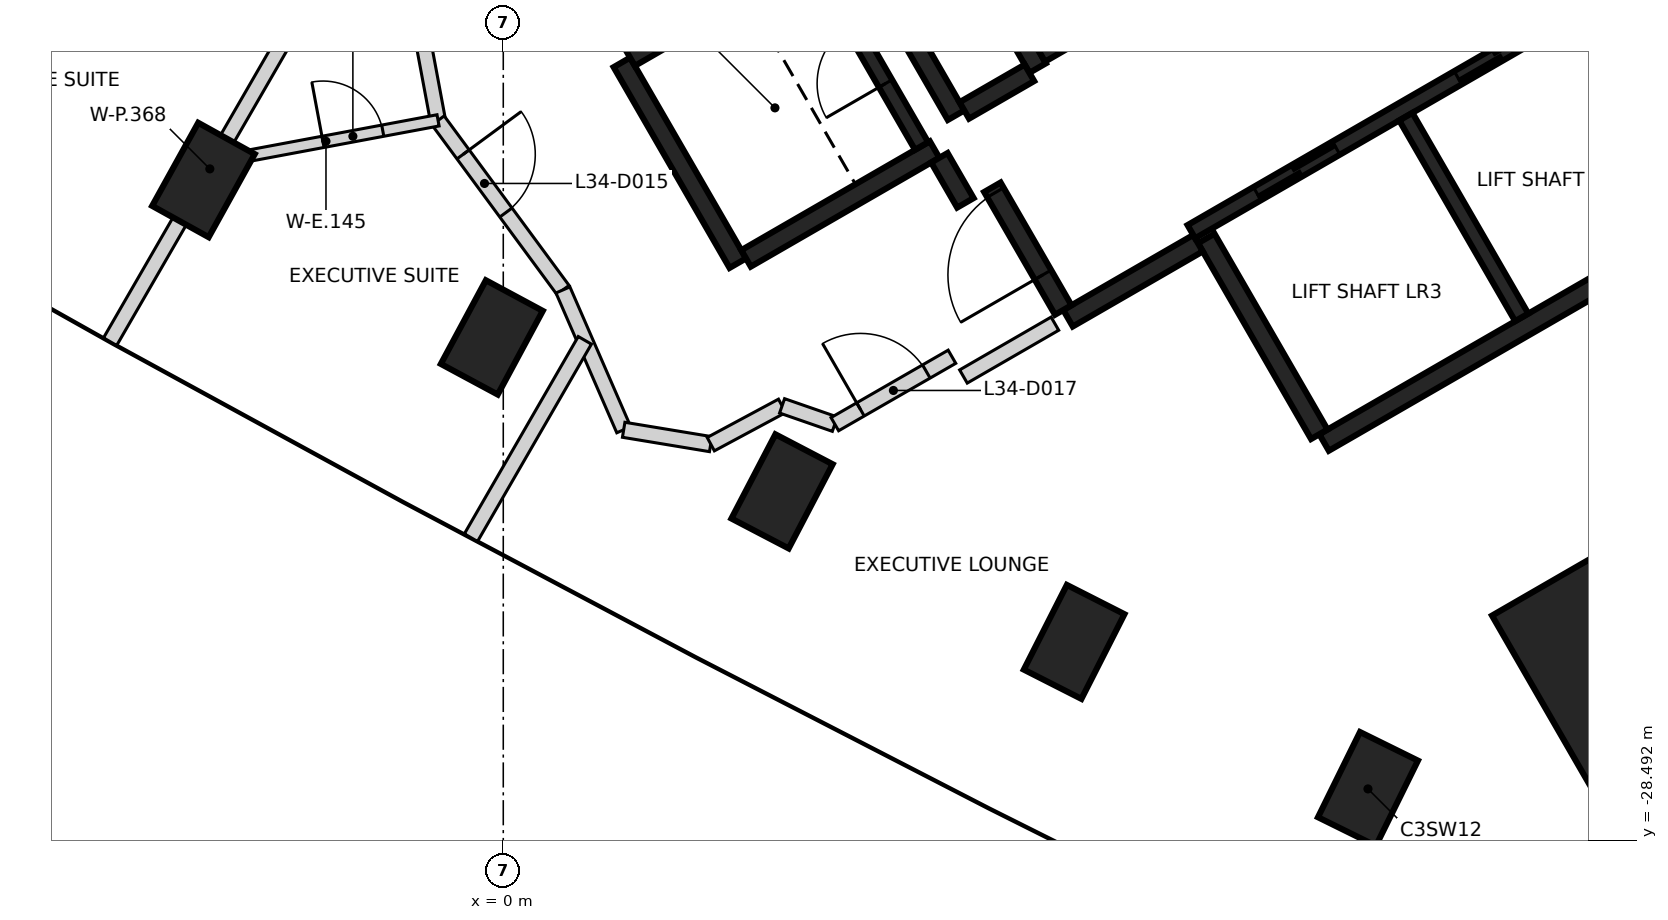
"""IFC4 building model, lengths in metres.
Left out: names, types, materials, properties, quantities, classifications, styles, units other than length and angle.
Written with IfcOpenShell. Run it as: python <this file> out.ifc"""

import sys

from ifc_helpers import new_model, si_unit, direction, frame, frame_2d, origin, origin_2d, place, context, subcontext, project, spatial, rectangle, extrude, element, fill, save


model = new_model("IFC4")
c1 = context("Model", 3, precision=1e-05, world=origin(), true_north=direction((0.0, 1.0)))
c2 = subcontext(c1, "Body", "Model", "MODEL_VIEW")
j1 = project(units=[si_unit("LENGTHUNIT", "METRE"), si_unit("PLANEANGLEUNIT", "RADIAN")], contexts=[c1])
p1 = place(None, origin())
s1 = spatial("IfcSite", under=j1, at=p1, CompositionType="ELEMENT")
p2 = place(p1, origin())
s2 = spatial("IfcBuilding", under=s1, at=p2, CompositionType="ELEMENT")
p3 = place(p2, frame((0.0, 0.0, 139.6)))
s3 = spatial("IfcBuildingStorey", under=s2, at=p3, CompositionType="ELEMENT", Elevation=139.6)
for number, where, z_axis, x_axis in (
    (1, (-3.945, -19.8, -0.4), (0.0, 0.0, 1.0), (0.485, 0.875, 0.0)),
    (2, (-0.151, -21.871, -0.4), (0.0, 0.0, 1.0), (0.474, 0.881, 0.0)),
    (3, (3.667, -23.896, -0.4), (0.0, 0.0, 1.0), (0.463, 0.886, 0.0)),
    (4, (7.51, -25.876, -0.4), (0.0, 0.0, 1.0), (0.453, 0.892, 0.0)),
    (5, (11.376, -27.811, -0.4), (0.0, 0.0, 1.0), (0.442, 0.897, 0.0)),
):
    element("IfcColumn", number, at=place(p3, frame(where, z_axis=z_axis, x_axis=x_axis)), inside=s3, PredefinedType="COLUMN", context=c2, shape_type="SweptSolid", body=[
        extrude(rectangle(XDim=1.25, YDim=0.85, at=origin_2d()), origin(), (0.0, 0.0, 1.0), 3.6),
    ])
p4 = place(p3, frame((15.207, -26.34, -0.4), z_axis=(0.0, 0.0, 1.0), x_axis=(-0.5, 0.866025403784, 0.0)))
e6 = element("IfcColumn", 6, at=p4, inside=s3, PredefinedType="COLUMN", context=c2, shape_type="SweptSolid", body=[
    extrude(rectangle(XDim=3.6, YDim=3.0, at=origin_2d()), origin(), (0.0, 0.0, 1.0), 3.6),
])
p5 = place(p3, frame((15.865, -20.328, 0.0), z_axis=(0.0, 0.0, 1.0), x_axis=(-0.86602852612, -0.499994591916, 0.0)))
e7 = element("IfcWall", 7, at=p5, inside=s3, PredefinedType="SHEAR", context=c2, shape_type="SweptSolid", body=[
    extrude(rectangle(XDim=5.85, YDim=0.25, at=frame_2d((2.925, 0.0))), origin(), (0.0, 0.0, 1.0), 3.2),
])
p6 = place(p3, frame((7.031, -18.327, 0.0), z_axis=(0.0, 0.0, 1.0), x_axis=(-0.499971222258, 0.866042017984, 0.0)))
e8 = element("IfcWall", 8, at=p6, inside=s3, PredefinedType="SHEAR", context=c2, shape_type="SweptSolid", body=[
    extrude(rectangle(XDim=3.2, YDim=0.25, at=frame_2d((1.6, 0.0))), origin(), (0.0, 0.0, 1.0), 3.2),
])
for number, where, z_axis, x_axis in (
    (9, (14.315, -17.644, 0.0), (0.0, 0.0, 1.0), (0.5, -0.866, 0.0)),
    (10, (10.736, -23.145, 0.0), (0.0, 0.0, 1.0), (-0.5, 0.866, 0.0)),
):
    element("IfcWall", number, at=place(p3, frame(where, z_axis=z_axis, x_axis=x_axis)), inside=s3, PredefinedType="SHEAR", context=c2, shape_type="SweptSolid", body=[
        extrude(rectangle(XDim=2.974, YDim=0.25, at=frame_2d((1.487, 0.0))), origin(), (0.0, 0.0, 1.0), 3.2),
    ])
p7 = place(p3, frame((3.085, -20.894, 0.0), z_axis=(0.0, 0.0, 1.0), x_axis=(-0.499978833458, 0.866037623948, 0.0)))
e11 = element("IfcWall", 11, at=p7, inside=s3, PredefinedType="SHEAR", context=c2, shape_type="SweptSolid", body=[
    extrude(rectangle(XDim=3.05, YDim=0.25, at=frame_2d((1.525, 0.0))), origin(), (0.0, 0.0, 1.0), 3.2),
])
p8 = place(p3, frame((1.669, -18.19, 0.0), z_axis=(0.0, 0.0, 1.0), x_axis=(0.866042235819, 0.499970844928, 0.0)))
e12 = element("IfcWall", 12, at=p8, inside=s3, PredefinedType="SHEAR", context=c2, shape_type="SweptSolid", body=[
    extrude(rectangle(XDim=2.865, YDim=0.25, at=frame_2d((1.432, 0.0))), origin(), (0.0, 0.0, 1.0), 3.2),
])
p9 = place(p3, frame((5.675, -19.399, 0.0), z_axis=(0.0, 0.0, 1.0), x_axis=(-0.866026637627, -0.499997862916, 0.0)))
e13 = element("IfcWall", 13, at=p9, inside=s3, PredefinedType="SHEAR", context=c2, shape_type="SweptSolid", body=[
    extrude(rectangle(XDim=2.865, YDim=0.25, at=frame_2d((1.432, 0.0))), origin(), (0.0, 0.0, 1.0), 3.2),
])
p10 = place(p3, frame((4.414, -16.276, 0.0), z_axis=(0.0, 0.0, 1.0), x_axis=(0.500003324108, -0.866023484601, 0.0)))
e14 = element("IfcWall", 14, at=p10, inside=s3, PredefinedType="SHEAR", context=c2, shape_type="SweptSolid", body=[
    extrude(rectangle(XDim=3.085, YDim=0.25, at=frame_2d((1.542, 0.0))), origin(), (0.0, 0.0, 1.0), 3.2),
])
p11 = place(p3, frame((9.14, -20.631, 0.0), z_axis=(0.0, 0.0, 1.0), x_axis=(-0.866043531843, -0.499968599967, 0.0)))
e15 = element("IfcWall", 15, at=p11, inside=s3, PredefinedType="SHEAR", context=c2, shape_type="SweptSolid", body=[
    extrude(rectangle(XDim=1.975, YDim=0.25, at=frame_2d((0.987, 0.0))), origin(), (0.0, 0.0, 1.0), 3.2),
])
p12 = place(p3, frame((7.367, -21.51, 0.0), z_axis=(0.0, 0.0, 1.0), x_axis=(-0.499983108224, 0.866035156036, 0.0)))
e16 = element("IfcWall", 16, at=p12, inside=s3, PredefinedType="SHEAR", context=c2, shape_type="SweptSolid", body=[
    extrude(rectangle(XDim=1.865, YDim=0.25, at=frame_2d((0.932, 0.0))), origin(), (0.0, 0.0, 1.0), 3.2),
])
p13 = place(p12, frame((0.535, 0.0, 0.0)))
e17 = element("IfcOpeningElement", 17, at=p13, cuts=e16, PredefinedType="OPENING", context=c2, shape_type="SweptSolid", body=[
    extrude(rectangle(XDim=1.25, YDim=2.1, at=frame_2d((0.625, 1.05))), frame((0.0, 0.135, 0.0), z_axis=(0.0, -1.0, 0.0), x_axis=(1.0, 0.0, 0.0)), (0.0, 0.0, 1.0), 0.27),
])
p14 = place(p3, frame((6.065, -18.885, 0.0), z_axis=(0.0, 0.0, 1.0), x_axis=(0.866017078145, 0.500014420154, 0.0)))
e18 = element("IfcWall", 18, at=p14, inside=s3, PredefinedType="SHEAR", context=c2, shape_type="SweptSolid", body=[
    extrude(rectangle(XDim=0.989, YDim=0.25, at=frame_2d((0.495, 0.0))), origin(), (0.0, 0.0, 1.0), 3.2),
])
p15 = place(p3, frame((6.08, -20.1, 0.0), z_axis=(0.0, 0.0, 1.0), x_axis=(-0.500051773299, 0.865995510393, 0.0)))
e19 = element("IfcWall", 19, at=p15, inside=s3, PredefinedType="SHEAR", context=c2, shape_type="SweptSolid", body=[
    extrude(rectangle(XDim=0.685, YDim=0.25, at=frame_2d((0.342, 0.0))), origin(), (0.0, 0.0, 1.0), 3.2),
])
p16 = place(p3, frame((9.052, -20.48, 0.0), z_axis=(0.0, 0.0, 1.0), x_axis=(0.866030299012, 0.499991521122, 0.0)))
e20 = element("IfcWall", 20, at=p16, inside=s3, PredefinedType="SHEAR", context=c2, shape_type="SweptSolid", body=[
    extrude(rectangle(XDim=6.1, YDim=0.2, at=frame_2d((3.05, 0.0))), origin(), (0.0, 0.0, 1.0), 3.2),
])
p17 = place(p16, frame((1.0, 0.0, 0.0)))
e21 = element("IfcOpeningElement", 21, at=p17, cuts=e20, PredefinedType="OPENING", context=c2, shape_type="SweptSolid", body=[
    extrude(rectangle(XDim=1.2, YDim=2.1, at=frame_2d((0.6, 1.05))), frame((0.0, 0.11, 0.0), z_axis=(0.0, -1.0, 0.0), x_axis=(1.0, 0.0, 0.0)), (0.0, 0.0, 1.0), 0.22),
])
p18 = place(p16, frame((4.05, 0.0, 0.0)))
e22 = element("IfcOpeningElement", 22, at=p18, cuts=e20, PredefinedType="OPENING", context=c2, shape_type="SweptSolid", body=[
    extrude(rectangle(XDim=1.2, YDim=2.1, at=frame_2d((0.6, 1.05))), frame((0.0, 0.11, 0.0), z_axis=(0.0, -1.0, 0.0), x_axis=(1.0, 0.0, 0.0)), (0.0, 0.0, 1.0), 0.22),
])
p19 = place(p3, frame((7.077, -18.156, 0.0), z_axis=(0.0, 0.0, 1.0), x_axis=(0.866038630372, 0.499977090179, 0.0)))
e23 = element("IfcWall", 23, at=p19, inside=s3, PredefinedType="SHEAR", context=c2, shape_type="SweptSolid", body=[
    extrude(rectangle(XDim=5.699, YDim=0.2, at=frame_2d((2.85, 0.0))), origin(), (0.0, 0.0, 1.0), 3.2),
])
p20 = place(p19, frame((0.899, 0.0, 0.0)))
e24 = element("IfcOpeningElement", 24, at=p20, cuts=e23, PredefinedType="OPENING", context=c2, shape_type="SweptSolid", body=[
    extrude(rectangle(XDim=0.9, YDim=2.1, at=frame_2d((0.45, 1.05))), frame((0.0, 0.11, 0.0), z_axis=(0.0, -1.0, 0.0), x_axis=(1.0, 0.0, 0.0)), (0.0, 0.0, 1.0), 0.22),
])
p21 = place(p19, frame((3.874, 0.0, 0.0)))
e25 = element("IfcOpeningElement", 25, at=p21, cuts=e23, PredefinedType="OPENING", context=c2, shape_type="SweptSolid", body=[
    extrude(rectangle(XDim=0.9, YDim=2.1, at=frame_2d((0.45, 1.05))), frame((0.0, 0.11, 0.0), z_axis=(0.0, -1.0, 0.0), x_axis=(1.0, 0.0, 0.0)), (0.0, 0.0, 1.0), 0.22),
])
p22 = place(p3, frame((11.875, -18.967, 0.0), z_axis=(0.0, 0.0, 1.0), x_axis=(0.49998131003, -0.866036194175, 0.0)))
e26 = element("IfcWall", 26, at=p22, inside=s3, PredefinedType="SHEAR", context=c2, shape_type="SweptSolid", body=[
    extrude(rectangle(XDim=3.048, YDim=0.2, at=frame_2d((1.524, 0.0))), origin(), (0.0, 0.0, 1.0), 3.2),
])
p23 = place(p3, frame((5.503, -19.352, 0.0), z_axis=(0.0, 0.0, 1.0), x_axis=(-0.499986818241, 0.866033014143, 0.0)))
e27 = element("IfcWall", 27, at=p23, inside=s3, PredefinedType="SHEAR", context=c2, shape_type="SweptSolid", body=[
    extrude(rectangle(XDim=2.798, YDim=0.2, at=frame_2d((1.399, 0.0))), origin(), (0.0, 0.0, 1.0), 3.2),
])
p24 = place(p23, frame((0.949, 0.0, 0.0)))
e28 = element("IfcOpeningElement", 28, at=p24, cuts=e27, PredefinedType="OPENING", context=c2, shape_type="SweptSolid", body=[
    extrude(rectangle(XDim=0.9, YDim=2.1, at=frame_2d((0.45, 1.05))), frame((0.0, 0.11, 0.0), z_axis=(0.0, -1.0, 0.0), x_axis=(1.0, 0.0, 0.0)), (0.0, 0.0, 1.0), 0.22),
])
p25 = place(p3, frame((-1.212, -17.131, 0.0), z_axis=(0.0, 0.0, 1.0), x_axis=(0.183680924698, -0.982985919483, 0.0)))
e29 = element("IfcWall", 29, at=p25, inside=s3, PredefinedType="PARTITIONING", context=c2, shape_type="SweptSolid", body=[
    extrude(rectangle(XDim=1.917, YDim=0.2, at=frame_2d((0.958, 0.0))), origin(), (0.0, 0.0, 1.0), 3.2),
])
p26 = place(p3, frame((-0.858, -19.016, 0.0), z_axis=(0.0, 0.0, 1.0), x_axis=(0.593123867414, -0.805111220829, 0.0)))
e30 = element("IfcWall", 30, at=p26, inside=s3, PredefinedType="PARTITIONING", context=c2, shape_type="SweptSolid", body=[
    extrude(rectangle(XDim=2.77, YDim=0.2, at=frame_2d((1.385, 0.0))), origin(), (0.0, 0.0, 1.0), 3.2),
])
p27 = place(p26, frame((0.555, 0.0, 0.0)))
e31 = element("IfcOpeningElement", 31, at=p27, cuts=e30, PredefinedType="OPENING", context=c2, shape_type="SweptSolid", body=[
    extrude(rectangle(XDim=0.95, YDim=2.1, at=frame_2d((0.475, 1.05))), frame((0.0, 0.11, 0.0), z_axis=(0.0, -1.0, 0.0), x_axis=(1.0, 0.0, 0.0)), (0.0, 0.0, 1.0), 0.22),
])
p28 = place(p3, frame((0.785, -21.246, 0.0), z_axis=(0.0, 0.0, 1.0), x_axis=(0.398864077761, -0.917010058545, 0.0)))
e32 = element("IfcWall", 32, at=p28, inside=s3, PredefinedType="PARTITIONING", context=c2, shape_type="SweptSolid", body=[
    extrude(rectangle(XDim=2.006, YDim=0.2, at=frame_2d((1.003, 0.0))), origin(), (0.0, 0.0, 1.0), 2.3),
])
p29 = place(p3, frame((1.584, -23.086, 0.0), z_axis=(0.0, 0.0, 1.0), x_axis=(0.986654221629, -0.162829502674, 0.0)))
e33 = element("IfcWall", 33, at=p29, inside=s3, PredefinedType="PARTITIONING", context=c2, shape_type="SweptSolid", body=[
    extrude(rectangle(XDim=1.16, YDim=0.2, at=frame_2d((0.58, 0.0))), origin(), (0.0, 0.0, 1.0), 2.3),
])
p30 = place(p3, frame((2.73, -23.275, 0.0), z_axis=(0.0, 0.0, 1.0), x_axis=(0.880927165636, 0.473251866182, 0.0)))
e34 = element("IfcWall", 34, at=p30, inside=s3, PredefinedType="PARTITIONING", context=c2, shape_type="SweptSolid", body=[
    extrude(rectangle(XDim=1.065, YDim=0.2, at=frame_2d((0.532, 0.0))), origin(), (0.0, 0.0, 1.0), 3.2),
])
p31 = place(p3, frame((3.668, -22.771, 0.0), z_axis=(0.0, 0.0, 1.0), x_axis=(0.944689393684, -0.327966384652, 0.0)))
e35 = element("IfcWall", 35, at=p31, inside=s3, PredefinedType="PARTITIONING", context=c2, shape_type="SweptSolid", body=[
    extrude(rectangle(XDim=0.735, YDim=0.2, at=frame_2d((0.367, 0.0))), origin(), (0.0, 0.0, 1.0), 3.2),
])
p32 = place(p3, frame((4.362, -23.012, 0.0), z_axis=(0.0, 0.0, 1.0), x_axis=(0.866692617793, 0.49884256661, 0.0)))
e36 = element("IfcWall", 36, at=p32, inside=s3, PredefinedType="PARTITIONING", context=c2, shape_type="SweptSolid", body=[
    extrude(rectangle(XDim=1.778, YDim=0.2, at=frame_2d((0.889, 0.0))), origin(), (0.0, 0.0, 1.0), 3.2),
])
p33 = place(p32, frame((0.389, 0.0, 0.0)))
e37 = element("IfcOpeningElement", 37, at=p33, cuts=e36, PredefinedType="OPENING", context=c2, shape_type="SweptSolid", body=[
    extrude(rectangle(XDim=1.0, YDim=2.1, at=frame_2d((0.5, 1.05))), frame((0.0, 0.11, 0.0), z_axis=(0.0, -1.0, 0.0), x_axis=(1.0, 0.0, 0.0)), (0.0, 0.0, 1.0), 0.22),
])
p34 = place(p3, frame((6.054, -22.385, 0.0), z_axis=(0.0, 0.0, 1.0), x_axis=(0.86593101922, 0.500163443238, 0.0)))
e38 = element("IfcWall", 38, at=p34, inside=s3, PredefinedType="PARTITIONING", context=c2, shape_type="SweptSolid", body=[
    extrude(rectangle(XDim=1.39, YDim=0.2, at=frame_2d((0.695, 0.0))), origin(), (0.0, 0.0, 1.0), 3.2),
])
p35 = place(p3, frame((-9.882, -19.267, 0.0), z_axis=(0.0, 0.0, 1.0), x_axis=(0.499993811829, 0.866028976497, 0.0)))
e39 = element("IfcWall", 39, at=p35, inside=s3, PredefinedType="PARTITIONING", context=c2, shape_type="SweptSolid", body=[
    extrude(rectangle(XDim=12.227, YDim=0.2, at=frame_2d((6.114, 0.0))), origin(), (0.0, 0.0, 1.0), 2.3),
])
p36 = place(p3, frame((-5.173, -21.926, 0.0), z_axis=(0.0, 0.0, 1.0), x_axis=(0.499941227542, 0.86605933342, 0.0)))
e40 = element("IfcWall", 40, at=p36, inside=s3, PredefinedType="PARTITIONING", context=c2, shape_type="SweptSolid", body=[
    extrude(rectangle(XDim=5.249, YDim=0.2, at=frame_2d((2.625, 0.0))), origin(), (0.0, 0.0, 1.0), 3.2),
])
p37 = place(p3, frame((-0.425, -24.505, 0.0), z_axis=(0.0, 0.0, 1.0), x_axis=(0.499915194772, 0.86607436057, 0.0)))
e41 = element("IfcWall", 41, at=p37, inside=s3, PredefinedType="PARTITIONING", context=c2, shape_type="SweptSolid", body=[
    extrude(rectangle(XDim=2.997, YDim=0.2, at=frame_2d((1.499, 0.0))), origin(), (0.0, 0.0, 1.0), 2.3),
])
p38 = place(p3, frame((-3.807, -19.566, 0.0), z_axis=(0.0, 0.0, 1.0), x_axis=(0.982987155193, 0.183674311555, 0.0)))
e42 = element("IfcWall", 42, at=p38, inside=s3, PredefinedType="PARTITIONING", context=c2, shape_type="SweptSolid", body=[
    extrude(rectangle(XDim=3.0, YDim=0.15, at=frame_2d((1.5, 0.0))), origin(), (0.0, 0.0, 1.0), 3.2),
])
p39 = place(p38, frame((1.46, 0.0, 0.0)))
e43 = element("IfcOpeningElement", 43, at=p39, cuts=e42, PredefinedType="OPENING", context=c2, shape_type="SweptSolid", body=[
    extrude(rectangle(XDim=0.8, YDim=2.1, at=frame_2d((0.4, 1.05))), frame((0.0, 0.085, 0.0), z_axis=(0.0, -1.0, 0.0), x_axis=(1.0, 0.0, 0.0)), (0.0, 0.0, 1.0), 0.17),
])
p40 = place(p17, origin())
e44 = element("IfcDoor", 44, at=p40, inside=s3, OperationType="DOUBLE_DOOR_SLIDING", PredefinedType="DOOR", context=c2, shape_type="SweptSolid", body=[
    extrude(rectangle(XDim=1.2, YDim=2.1, at=frame_2d((0.6, 1.05))), frame((0.0, 0.025, 0.0), z_axis=(0.0, -1.0, 0.0), x_axis=(1.0, 0.0, 0.0)), (0.0, 0.0, 1.0), 0.05),
])
fill(e21, e44)
p41 = place(p18, origin())
e45 = element("IfcDoor", 45, at=p41, inside=s3, OperationType="DOUBLE_DOOR_SLIDING", PredefinedType="DOOR", context=c2, shape_type="SweptSolid", body=[
    extrude(rectangle(XDim=1.2, YDim=2.1, at=frame_2d((0.6, 1.05))), frame((0.0, 0.025, 0.0), z_axis=(0.0, -1.0, 0.0), x_axis=(1.0, 0.0, 0.0)), (0.0, 0.0, 1.0), 0.05),
])
fill(e22, e45)
p42 = place(p13, origin())
e46 = element("IfcDoor", 46, at=p42, inside=s3, OperationType="SINGLE_SWING_LEFT", PredefinedType="DOOR", context=c2, shape_type="SweptSolid", body=[
    extrude(rectangle(XDim=1.25, YDim=2.1, at=frame_2d((0.625, 1.05))), frame((0.0, 0.025, 0.0), z_axis=(0.0, -1.0, 0.0), x_axis=(1.0, 0.0, 0.0)), (0.0, 0.0, 1.0), 0.05),
])
fill(e17, e46)
p43 = place(p24, origin())
e47 = element("IfcDoor", 47, at=p43, inside=s3, OperationType="SINGLE_SWING_RIGHT", PredefinedType="DOOR", context=c2, shape_type="SweptSolid", body=[
    extrude(rectangle(XDim=0.9, YDim=2.1, at=frame_2d((0.45, 1.05))), frame((0.0, 0.025, 0.0), z_axis=(0.0, -1.0, 0.0), x_axis=(1.0, 0.0, 0.0)), (0.0, 0.0, 1.0), 0.05),
])
fill(e28, e47)
p44 = place(p27, frame((0.95, 0.0, 0.0), z_axis=(0.0, 0.0, 1.0), x_axis=(-1.0, 0.0, 0.0)))
e48 = element("IfcDoor", 48, at=p44, inside=s3, OperationType="SINGLE_SWING_LEFT", PredefinedType="DOOR", context=c2, shape_type="SweptSolid", body=[
    extrude(rectangle(XDim=0.95, YDim=2.1, at=frame_2d((0.475, 1.05))), frame((0.0, 0.025, 0.0), z_axis=(0.0, -1.0, 0.0), x_axis=(1.0, 0.0, 0.0)), (0.0, 0.0, 1.0), 0.05),
])
fill(e31, e48)
p45 = place(p39, frame((0.8, 0.0, 0.0), z_axis=(0.0, 0.0, 1.0), x_axis=(-1.0, 0.0, 0.0)))
e49 = element("IfcDoor", 49, at=p45, inside=s3, OperationType="SINGLE_SWING_LEFT", PredefinedType="DOOR", context=c2, shape_type="SweptSolid", body=[
    extrude(rectangle(XDim=0.8, YDim=2.1, at=frame_2d((0.4, 1.05))), frame((0.0, 0.025, 0.0), z_axis=(0.0, -1.0, 0.0), x_axis=(1.0, 0.0, 0.0)), (0.0, 0.0, 1.0), 0.05),
])
fill(e43, e49)
p46 = place(p33, frame((1.0, 0.0, 0.0), z_axis=(0.0, 0.0, 1.0), x_axis=(-1.0, 0.0, 0.0)))
e50 = element("IfcDoor", 50, at=p46, inside=s3, OperationType="SINGLE_SWING_LEFT", PredefinedType="DOOR", context=c2, shape_type="SweptSolid", body=[
    extrude(rectangle(XDim=1.0, YDim=2.1, at=frame_2d((0.5, 1.05))), frame((0.0, 0.025, 0.0), z_axis=(0.0, -1.0, 0.0), x_axis=(1.0, 0.0, 0.0)), (0.0, 0.0, 1.0), 0.05),
])
fill(e37, e50)
save(model, sys.argv[1])
